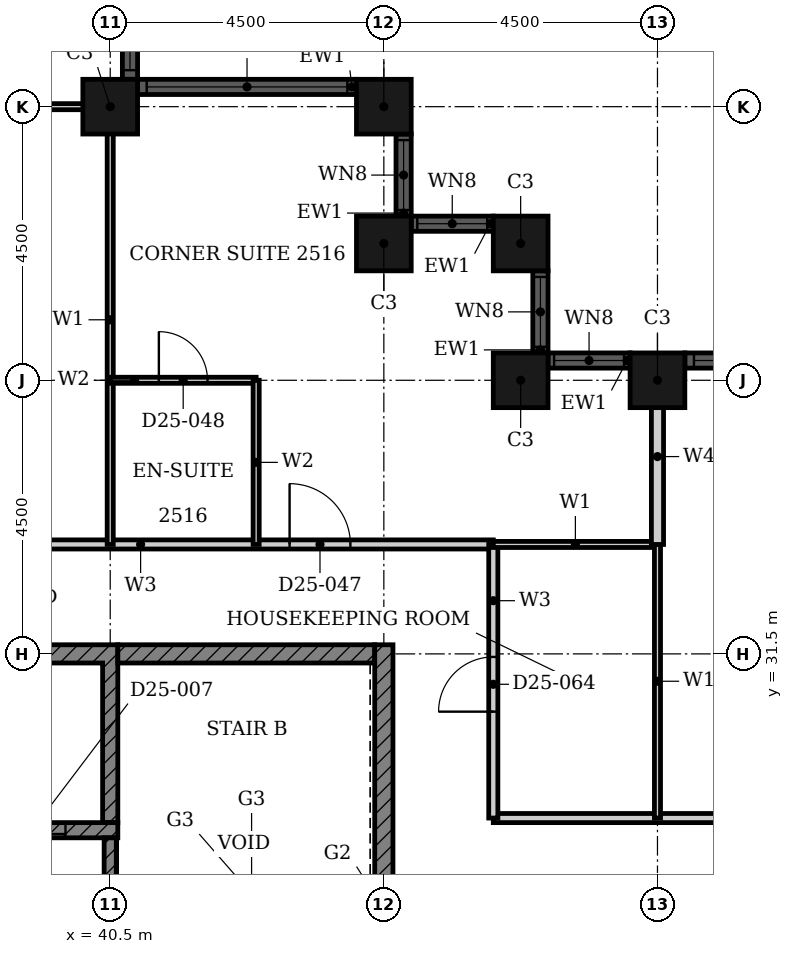
"""IFC4 building model, lengths in metres.
Left out: names, types, materials, properties, quantities, classifications, styles, units other than length and angle.
Written with IfcOpenShell. Run it as: python <this file> out.ifc"""

import sys

from ifc_helpers import new_model, si_unit, direction, frame, frame_2d, origin, origin_2d, place, context, subcontext, project, spatial, polyline, rectangle, hollow_rectangle, outline, extrude, element, fill, save


model = new_model("IFC4")
c1 = context("Model", 3, precision=1e-05, world=origin(), true_north=direction((0.0, 1.0)))
c2 = subcontext(c1, "Body", "Model", "MODEL_VIEW")
j1 = project(units=[si_unit("LENGTHUNIT", "METRE"), si_unit("PLANEANGLEUNIT", "RADIAN")], contexts=[c1])
p1 = place(None, origin())
s1 = spatial("IfcSite", under=j1, at=p1, CompositionType="ELEMENT")
p2 = place(p1, origin())
s2 = spatial("IfcBuilding", under=s1, at=p2, CompositionType="ELEMENT")
p3 = place(p2, frame((0.0, 0.0, 104.4)))
s3 = spatial("IfcBuildingStorey", under=s2, at=p3, CompositionType="ELEMENT", Elevation=104.4)
for number, where, z_axis, x_axis in (
    (1, (49.5, 36.0, 0.0), (0.0, 0.0, 1.0), (1.0, 0.0, 0.0)),
    (2, (47.25, 36.0, 0.0), (0.0, 0.0, 1.0), (1.0, 0.0, 0.0)),
    (3, (47.25, 38.25, 0.0), (0.0, 0.0, 1.0), (1.0, 0.0, 0.0)),
    (4, (45.0, 38.25, 0.0), (0.0, 0.0, 1.0), (1.0, 0.0, 0.0)),
    (5, (45.0, 40.5, 0.0), (0.0, 0.0, 1.0), (1.0, 0.0, 0.0)),
    (6, (40.5, 40.5, 0.0), (0.0, 0.0, 1.0), (1.0, 0.0, 0.0)),
):
    element("IfcColumn", number, at=place(p3, frame(where, z_axis=z_axis, x_axis=x_axis)), inside=s3, PredefinedType="COLUMN", context=c2, shape_type="SweptSolid", body=[
        extrude(hollow_rectangle(XDim=0.9, YDim=0.9, WallThickness=0.028, at=origin_2d()), origin(), (0.0, 0.0, 1.0), 3.6),
    ])
p4 = place(p3, frame((58.05, 36.325, 0.0), z_axis=(0.0, 0.0, 1.0), x_axis=(-1.0, 0.0, 0.0)))
e7 = element("IfcWall", 7, at=p4, inside=s3, PredefinedType="SOLIDWALL", context=c2, shape_type="SweptSolid", body=[
    extrude(rectangle(XDim=8.1, YDim=0.25, at=frame_2d((4.05, 0.0))), origin(), (0.0, 0.0, 1.0), 3.6),
])
p5 = place(p4, frame((0.15, 0.0, 0.9)))
e8 = element("IfcOpeningElement", 8, at=p5, cuts=e7, PredefinedType="OPENING", context=c2, shape_type="SweptSolid", body=[
    extrude(rectangle(XDim=3.3, YDim=2.08, at=frame_2d((1.65, 1.04))), frame((0.0, 0.135, 0.0), z_axis=(0.0, -1.0, 0.0), x_axis=(1.0, 0.0, 0.0)), (0.0, 0.0, 1.0), 0.27),
])
p6 = place(p4, frame((4.65, 0.0, 0.9)))
e9 = element("IfcOpeningElement", 9, at=p6, cuts=e7, PredefinedType="OPENING", context=c2, shape_type="SweptSolid", body=[
    extrude(rectangle(XDim=3.3, YDim=2.08, at=frame_2d((1.65, 1.04))), frame((0.0, 0.135, 0.0), z_axis=(0.0, -1.0, 0.0), x_axis=(1.0, 0.0, 0.0)), (0.0, 0.0, 1.0), 0.27),
])
p7 = place(p3, frame((49.05, 36.325, 0.0), z_axis=(0.0, 0.0, 1.0), x_axis=(-1.0, 0.0, 0.0)))
e10 = element("IfcWall", 10, at=p7, inside=s3, PredefinedType="SOLIDWALL", context=c2, shape_type="SweptSolid", body=[
    extrude(rectangle(XDim=1.35, YDim=0.25, at=frame_2d((0.675, 0.0))), origin(), (0.0, 0.0, 1.0), 3.6),
])
p8 = place(p7, frame((0.1, 0.0, 0.9)))
e11 = element("IfcOpeningElement", 11, at=p8, cuts=e10, PredefinedType="OPENING", context=c2, shape_type="SweptSolid", body=[
    extrude(rectangle(XDim=1.15, YDim=2.08, at=frame_2d((0.575, 1.04))), frame((0.0, 0.135, 0.0), z_axis=(0.0, -1.0, 0.0), x_axis=(1.0, 0.0, 0.0)), (0.0, 0.0, 1.0), 0.27),
])
p9 = place(p3, frame((47.575, 36.45, 0.0), z_axis=(0.0, 0.0, 1.0), x_axis=(0.0, 1.0, 0.0)))
e12 = element("IfcWall", 12, at=p9, inside=s3, PredefinedType="SOLIDWALL", context=c2, shape_type="SweptSolid", body=[
    extrude(rectangle(XDim=1.35, YDim=0.25, at=frame_2d((0.675, 0.0))), origin(), (0.0, 0.0, 1.0), 3.6),
])
p10 = place(p9, frame((0.1, 0.0, 0.9)))
e13 = element("IfcOpeningElement", 13, at=p10, cuts=e12, PredefinedType="OPENING", context=c2, shape_type="SweptSolid", body=[
    extrude(rectangle(XDim=1.15, YDim=2.08, at=frame_2d((0.575, 1.04))), frame((0.0, 0.135, 0.0), z_axis=(0.0, -1.0, 0.0), x_axis=(1.0, 0.0, 0.0)), (0.0, 0.0, 1.0), 0.27),
])
p11 = place(p3, frame((46.8, 38.575, 0.0), z_axis=(0.0, 0.0, 1.0), x_axis=(-1.0, 0.0, 0.0)))
e14 = element("IfcWall", 14, at=p11, inside=s3, PredefinedType="SOLIDWALL", context=c2, shape_type="SweptSolid", body=[
    extrude(rectangle(XDim=1.35, YDim=0.25, at=frame_2d((0.675, 0.0))), origin(), (0.0, 0.0, 1.0), 3.6),
])
p12 = place(p11, frame((0.1, 0.0, 0.9)))
e15 = element("IfcOpeningElement", 15, at=p12, cuts=e14, PredefinedType="OPENING", context=c2, shape_type="SweptSolid", body=[
    extrude(rectangle(XDim=1.15, YDim=2.08, at=frame_2d((0.575, 1.04))), frame((0.0, 0.135, 0.0), z_axis=(0.0, -1.0, 0.0), x_axis=(1.0, 0.0, 0.0)), (0.0, 0.0, 1.0), 0.27),
])
p13 = place(p3, frame((45.325, 38.7, 0.0), z_axis=(0.0, 0.0, 1.0), x_axis=(0.0, 1.0, 0.0)))
e16 = element("IfcWall", 16, at=p13, inside=s3, PredefinedType="SOLIDWALL", context=c2, shape_type="SweptSolid", body=[
    extrude(rectangle(XDim=1.35, YDim=0.25, at=frame_2d((0.675, 0.0))), origin(), (0.0, 0.0, 1.0), 3.6),
])
p14 = place(p13, frame((0.1, 0.0, 0.9)))
e17 = element("IfcOpeningElement", 17, at=p14, cuts=e16, PredefinedType="OPENING", context=c2, shape_type="SweptSolid", body=[
    extrude(rectangle(XDim=1.15, YDim=2.08, at=frame_2d((0.575, 1.04))), frame((0.0, 0.135, 0.0), z_axis=(0.0, -1.0, 0.0), x_axis=(1.0, 0.0, 0.0)), (0.0, 0.0, 1.0), 0.27),
])
p15 = place(p3, frame((44.55, 40.825, 0.0), z_axis=(0.0, 0.0, 1.0), x_axis=(-1.0, 0.0, 0.0)))
e18 = element("IfcWall", 18, at=p15, inside=s3, PredefinedType="SOLIDWALL", context=c2, shape_type="SweptSolid", body=[
    extrude(rectangle(XDim=3.6, YDim=0.25, at=frame_2d((1.8, 0.0))), origin(), (0.0, 0.0, 1.0), 3.6),
])
p16 = place(p15, frame((0.15, 0.0, 0.9)))
e19 = element("IfcOpeningElement", 19, at=p16, cuts=e18, PredefinedType="OPENING", context=c2, shape_type="SweptSolid", body=[
    extrude(rectangle(XDim=3.3, YDim=2.08, at=frame_2d((1.65, 1.04))), frame((0.0, 0.135, 0.0), z_axis=(0.0, -1.0, 0.0), x_axis=(1.0, 0.0, 0.0)), (0.0, 0.0, 1.0), 0.27),
])
p17 = place(p3, frame((40.825, 40.95, 0.0), z_axis=(0.0, 0.0, 1.0), x_axis=(0.0, 1.0, 0.0)))
e20 = element("IfcWall", 20, at=p17, inside=s3, PredefinedType="SOLIDWALL", context=c2, shape_type="SweptSolid", body=[
    extrude(rectangle(XDim=8.1, YDim=0.25, at=frame_2d((4.05, 0.0))), origin(), (0.0, 0.0, 1.0), 3.6),
])
p18 = place(p17, frame((0.15, 0.0, 0.9)))
e21 = element("IfcOpeningElement", 21, at=p18, cuts=e20, PredefinedType="OPENING", context=c2, shape_type="SweptSolid", body=[
    extrude(rectangle(XDim=3.3, YDim=2.08, at=frame_2d((1.65, 1.04))), frame((0.0, 0.135, 0.0), z_axis=(0.0, -1.0, 0.0), x_axis=(1.0, 0.0, 0.0)), (0.0, 0.0, 1.0), 0.27),
])
p19 = place(p17, frame((4.65, 0.0, 0.9)))
e22 = element("IfcOpeningElement", 22, at=p19, cuts=e20, PredefinedType="OPENING", context=c2, shape_type="SweptSolid", body=[
    extrude(rectangle(XDim=3.3, YDim=2.08, at=frame_2d((1.65, 1.04))), frame((0.0, 0.135, 0.0), z_axis=(0.0, -1.0, 0.0), x_axis=(1.0, 0.0, 0.0)), (0.0, 0.0, 1.0), 0.27),
])
p20 = place(p3, origin())
e23 = element("IfcWall", 23, at=p20, inside=s3, PredefinedType="SHEAR", context=c2, shape_type="SweptSolid", body=[
    extrude(outline(polyline([(24.947, 28.725), (25.197, 28.725), (25.197, 31.35), (27.518, 31.35), (27.518, 28.725), (27.768, 28.725), (27.768, 31.35), (30.089, 31.35), (30.089, 28.725), (30.339, 28.725), (30.339, 31.35), (32.661, 31.35), (32.661, 28.725), (32.911, 28.725), (32.911, 31.35), (35.232, 31.35), (35.232, 28.725), (35.482, 28.725), (35.482, 31.35), (37.803, 31.35), (37.803, 28.725), (38.053, 28.725), (38.053, 31.35), (40.375, 31.35), (40.375, 28.725), (40.625, 28.725), (40.625, 31.65), (24.947, 31.65), (24.947, 28.725)])), origin(), (0.0, 0.0, 1.0), 3.3),
])
p21 = place(p3, frame((40.625, 31.5, 0.0), z_axis=(0.0, 0.0, 1.0), x_axis=(1.0, 0.0, 0.0)))
e24 = element("IfcWall", 24, at=p21, inside=s3, PredefinedType="SHEAR", context=c2, shape_type="SweptSolid", body=[
    extrude(rectangle(XDim=4.225, YDim=0.3, at=frame_2d((2.113, 0.0))), origin(), (0.0, 0.0, 1.0), 3.3),
])
p22 = place(p3, frame((45.0, 22.35, 0.0), z_axis=(0.0, 0.0, 1.0), x_axis=(0.0, 1.0, 0.0)))
e25 = element("IfcWall", 25, at=p22, inside=s3, PredefinedType="SHEAR", context=c2, shape_type="SweptSolid", body=[
    extrude(rectangle(XDim=9.3, YDim=0.3, at=frame_2d((4.65, 0.0))), origin(), (0.0, 0.0, 1.0), 3.3),
])
p23 = place(p3, frame((24.947, 28.6, 0.0), z_axis=(0.0, 0.0, 1.0), x_axis=(1.0, 0.0, 0.0)))
e26 = element("IfcWall", 26, at=p23, inside=s3, PredefinedType="SHEAR", context=c2, shape_type="SweptSolid", body=[
    extrude(rectangle(XDim=15.678, YDim=0.25, at=frame_2d((7.839, 0.0))), origin(), (0.0, 0.0, 1.0), 3.3),
])
p24 = place(p23, frame((0.861, 0.0, 0.0)))
e27 = element("IfcOpeningElement", 27, at=p24, cuts=e26, PredefinedType="OPENING", context=c2, shape_type="SweptSolid", body=[
    extrude(rectangle(XDim=1.1, YDim=2.1, at=frame_2d((0.55, 1.05))), frame((0.0, 0.135, 0.0), z_axis=(0.0, -1.0, 0.0), x_axis=(1.0, 0.0, 0.0)), (0.0, 0.0, 1.0), 0.27),
])
p25 = place(p23, frame((8.575, 0.0, 0.0)))
e28 = element("IfcOpeningElement", 28, at=p25, cuts=e26, PredefinedType="OPENING", context=c2, shape_type="SweptSolid", body=[
    extrude(rectangle(XDim=1.1, YDim=2.1, at=frame_2d((0.55, 1.05))), frame((0.0, 0.135, 0.0), z_axis=(0.0, -1.0, 0.0), x_axis=(1.0, 0.0, 0.0)), (0.0, 0.0, 1.0), 0.27),
])
p26 = place(p23, frame((13.718, 0.0, 0.0)))
e29 = element("IfcOpeningElement", 29, at=p26, cuts=e26, PredefinedType="OPENING", context=c2, shape_type="SweptSolid", body=[
    extrude(rectangle(XDim=1.1, YDim=2.1, at=frame_2d((0.55, 1.05))), frame((0.0, 0.135, 0.0), z_axis=(0.0, -1.0, 0.0), x_axis=(1.0, 0.0, 0.0)), (0.0, 0.0, 1.0), 0.27),
])
p27 = place(p3, frame((40.5, 22.65, 0.0), z_axis=(0.0, 0.0, 1.0), x_axis=(0.0, 1.0, 0.0)))
e30 = element("IfcWall", 30, at=p27, inside=s3, PredefinedType="SHEAR", context=c2, shape_type="SweptSolid", body=[
    extrude(rectangle(XDim=5.825, YDim=0.2, at=frame_2d((2.913, 0.0))), origin(), (0.0, 0.0, 1.0), 3.3),
])
p28 = place(p27, frame((0.25, 0.0, 0.0)))
e31 = element("IfcOpeningElement", 31, at=p28, cuts=e30, PredefinedType="OPENING", context=c2, shape_type="SweptSolid", body=[
    extrude(rectangle(XDim=1.8, YDim=2.1, at=frame_2d((0.9, 1.05))), frame((0.0, 0.11, 0.0), z_axis=(0.0, -1.0, 0.0), x_axis=(1.0, 0.0, 0.0)), (0.0, 0.0, 1.0), 0.22),
])
p29 = place(p3, frame((46.8, 28.8, 0.0), z_axis=(0.0, 0.0, 1.0), x_axis=(1.0, 0.0, 0.0)))
e32 = element("IfcWall", 32, at=p29, inside=s3, PredefinedType="PARTITIONING", context=c2, shape_type="SweptSolid", body=[
    extrude(rectangle(XDim=11.7, YDim=0.15, at=frame_2d((5.85, 0.0))), origin(), (0.0, 0.0, 1.0), 3.3),
])
p30 = place(p29, frame((4.45, 0.0, 0.0)))
e33 = element("IfcOpeningElement", 33, at=p30, cuts=e32, PredefinedType="OPENING", context=c2, shape_type="SweptSolid", body=[
    extrude(rectangle(XDim=1.0, YDim=2.1, at=frame_2d((0.5, 1.05))), frame((0.0, 0.085, 0.0), z_axis=(0.0, -1.0, 0.0), x_axis=(1.0, 0.0, 0.0)), (0.0, 0.0, 1.0), 0.17),
])
p31 = place(p3, frame((33.3, 33.3, 0.0), z_axis=(0.0, 0.0, 1.0), x_axis=(1.0, 0.0, 0.0)))
e34 = element("IfcWall", 34, at=p31, inside=s3, PredefinedType="PARTITIONING", context=c2, shape_type="SweptSolid", body=[
    extrude(rectangle(XDim=13.5, YDim=0.15, at=frame_2d((6.75, 0.0))), origin(), (0.0, 0.0, 1.0), 3.3),
])
p32 = place(p31, frame((10.15, 0.0, 0.0)))
e35 = element("IfcOpeningElement", 35, at=p32, cuts=e34, PredefinedType="OPENING", context=c2, shape_type="SweptSolid", body=[
    extrude(rectangle(XDim=1.0, YDim=2.1, at=frame_2d((0.5, 1.05))), frame((0.0, 0.085, 0.0), z_axis=(0.0, -1.0, 0.0), x_axis=(1.0, 0.0, 0.0)), (0.0, 0.0, 1.0), 0.17),
])
p33 = place(p31, frame((0.75, 0.0, 0.0)))
e36 = element("IfcOpeningElement", 36, at=p33, cuts=e34, PredefinedType="OPENING", context=c2, shape_type="SweptSolid", body=[
    extrude(rectangle(XDim=0.9, YDim=2.1, at=frame_2d((0.45, 1.05))), frame((0.0, 0.085, 0.0), z_axis=(0.0, -1.0, 0.0), x_axis=(1.0, 0.0, 0.0)), (0.0, 0.0, 1.0), 0.17),
])
p34 = place(p31, frame((4.35, 0.0, 0.0)))
e37 = element("IfcOpeningElement", 37, at=p34, cuts=e34, PredefinedType="OPENING", context=c2, shape_type="SweptSolid", body=[
    extrude(rectangle(XDim=0.9, YDim=2.1, at=frame_2d((0.45, 1.05))), frame((0.0, 0.085, 0.0), z_axis=(0.0, -1.0, 0.0), x_axis=(1.0, 0.0, 0.0)), (0.0, 0.0, 1.0), 0.17),
])
p35 = place(p3, frame((46.8, 28.8, 0.0), z_axis=(0.0, 0.0, 1.0), x_axis=(0.0, 1.0, 0.0)))
e38 = element("IfcWall", 38, at=p35, inside=s3, PredefinedType="PARTITIONING", context=c2, shape_type="SweptSolid", body=[
    extrude(rectangle(XDim=4.5, YDim=0.15, at=frame_2d((2.25, 0.0))), origin(), (0.0, 0.0, 1.0), 3.3),
])
p36 = place(p35, frame((1.75, 0.0, 0.0)))
e39 = element("IfcOpeningElement", 39, at=p36, cuts=e38, PredefinedType="OPENING", context=c2, shape_type="SweptSolid", body=[
    extrude(rectangle(XDim=0.9, YDim=2.1, at=frame_2d((0.45, 1.05))), frame((0.0, 0.085, 0.0), z_axis=(0.0, -1.0, 0.0), x_axis=(1.0, 0.0, 0.0)), (0.0, 0.0, 1.0), 0.17),
])
p37 = place(p3, frame((46.8, 33.3, 0.0), z_axis=(0.0, 0.0, 1.0), x_axis=(1.0, 0.0, 0.0)))
e40 = element("IfcWall", 40, at=p37, inside=s3, PredefinedType="PARTITIONING", context=c2, shape_type="SweptSolid", body=[
    extrude(rectangle(XDim=2.7, YDim=0.1, at=frame_2d((1.35, 0.0))), origin(), (0.0, 0.0, 1.0), 3.3),
])
p38 = place(p3, frame((33.3, 40.5, 0.0), z_axis=(0.0, 0.0, 1.0), x_axis=(1.0, 0.0, 0.0)))
e41 = element("IfcWall", 41, at=p38, inside=s3, PredefinedType="PARTITIONING", context=c2, shape_type="SweptSolid", body=[
    extrude(rectangle(XDim=7.39, YDim=0.1, at=frame_2d((3.695, 0.0))), origin(), (0.0, 0.0, 1.0), 2.38),
])
p39 = place(p3, frame((40.5, 33.3, 0.0), z_axis=(0.0, 0.0, 1.0), x_axis=(0.0, 1.0, 0.0)))
e42 = element("IfcWall", 42, at=p39, inside=s3, PredefinedType="PARTITIONING", context=c2, shape_type="SweptSolid", body=[
    extrude(rectangle(XDim=7.39, YDim=0.1, at=frame_2d((3.695, 0.0))), origin(), (0.0, 0.0, 1.0), 3.3),
])
p40 = place(p3, frame((49.5, 28.8, 0.0), z_axis=(0.0, 0.0, 1.0), x_axis=(0.0, 1.0, 0.0)))
e43 = element("IfcWall", 43, at=p40, inside=s3, PredefinedType="PARTITIONING", context=c2, shape_type="SweptSolid", body=[
    extrude(rectangle(XDim=4.5, YDim=0.1, at=frame_2d((2.25, 0.0))), origin(), (0.0, 0.0, 1.0), 2.38),
])
p41 = place(p3, frame((49.5, 33.3, 0.0), z_axis=(0.0, 0.0, 1.0), x_axis=(0.0, 1.0, 0.0)))
e44 = element("IfcWall", 44, at=p41, inside=s3, PredefinedType="PARTITIONING", context=c2, shape_type="SweptSolid", body=[
    extrude(rectangle(XDim=2.89, YDim=0.2, at=frame_2d((1.445, 0.0))), origin(), (0.0, 0.0, 1.0), 2.38),
])
p42 = place(p3, frame((40.5, 36.0, 0.0), z_axis=(0.0, 0.0, 1.0), x_axis=(1.0, 0.0, 0.0)))
e45 = element("IfcWall", 45, at=p42, inside=s3, PredefinedType="PARTITIONING", context=c2, shape_type="SweptSolid", body=[
    extrude(rectangle(XDim=2.4, YDim=0.1, at=frame_2d((1.2, 0.0))), origin(), (0.0, 0.0, 1.0), 3.3),
])
p43 = place(p42, frame((0.8, 0.0, 0.0)))
e46 = element("IfcOpeningElement", 46, at=p43, cuts=e45, PredefinedType="OPENING", context=c2, shape_type="SweptSolid", body=[
    extrude(rectangle(XDim=0.8, YDim=2.1, at=frame_2d((0.4, 1.05))), frame((0.0, 0.06, 0.0), z_axis=(0.0, -1.0, 0.0), x_axis=(1.0, 0.0, 0.0)), (0.0, 0.0, 1.0), 0.12),
])
p44 = place(p3, frame((42.9, 33.3, 0.0), z_axis=(0.0, 0.0, 1.0), x_axis=(0.0, 1.0, 0.0)))
e47 = element("IfcWall", 47, at=p44, inside=s3, PredefinedType="PARTITIONING", context=c2, shape_type="SweptSolid", body=[
    extrude(rectangle(XDim=2.7, YDim=0.1, at=frame_2d((1.35, 0.0))), origin(), (0.0, 0.0, 1.0), 3.3),
])
p45 = place(p6, origin())
e48 = element("IfcWindow", 48, at=p45, inside=s3, PartitioningType="SINGLE_PANEL", PredefinedType="WINDOW", context=c2, shape_type="SweptSolid", body=[
    extrude(rectangle(XDim=3.3, YDim=2.08, at=frame_2d((1.65, 1.04))), frame((0.0, 0.03, 0.0), z_axis=(0.0, -1.0, 0.0), x_axis=(1.0, 0.0, 0.0)), (0.0, 0.0, 1.0), 0.06),
])
fill(e9, e48)
p46 = place(p8, origin())
e49 = element("IfcWindow", 49, at=p46, inside=s3, PartitioningType="SINGLE_PANEL", PredefinedType="WINDOW", context=c2, shape_type="SweptSolid", body=[
    extrude(rectangle(XDim=1.15, YDim=2.08, at=frame_2d((0.575, 1.04))), frame((0.0, 0.03, 0.0), z_axis=(0.0, -1.0, 0.0), x_axis=(1.0, 0.0, 0.0)), (0.0, 0.0, 1.0), 0.06),
])
fill(e11, e49)
p47 = place(p10, origin())
e50 = element("IfcWindow", 50, at=p47, inside=s3, PartitioningType="SINGLE_PANEL", PredefinedType="WINDOW", context=c2, shape_type="SweptSolid", body=[
    extrude(rectangle(XDim=1.15, YDim=2.08, at=frame_2d((0.575, 1.04))), frame((0.0, 0.03, 0.0), z_axis=(0.0, -1.0, 0.0), x_axis=(1.0, 0.0, 0.0)), (0.0, 0.0, 1.0), 0.06),
])
fill(e13, e50)
p48 = place(p12, origin())
e51 = element("IfcWindow", 51, at=p48, inside=s3, PartitioningType="SINGLE_PANEL", PredefinedType="WINDOW", context=c2, shape_type="SweptSolid", body=[
    extrude(rectangle(XDim=1.15, YDim=2.08, at=frame_2d((0.575, 1.04))), frame((0.0, 0.03, 0.0), z_axis=(0.0, -1.0, 0.0), x_axis=(1.0, 0.0, 0.0)), (0.0, 0.0, 1.0), 0.06),
])
fill(e15, e51)
p49 = place(p14, origin())
e52 = element("IfcWindow", 52, at=p49, inside=s3, PartitioningType="SINGLE_PANEL", PredefinedType="WINDOW", context=c2, shape_type="SweptSolid", body=[
    extrude(rectangle(XDim=1.15, YDim=2.08, at=frame_2d((0.575, 1.04))), frame((0.0, 0.03, 0.0), z_axis=(0.0, -1.0, 0.0), x_axis=(1.0, 0.0, 0.0)), (0.0, 0.0, 1.0), 0.06),
])
fill(e17, e52)
p50 = place(p16, origin())
e53 = element("IfcWindow", 53, at=p50, inside=s3, PartitioningType="SINGLE_PANEL", PredefinedType="WINDOW", context=c2, shape_type="SweptSolid", body=[
    extrude(rectangle(XDim=3.3, YDim=2.08, at=frame_2d((1.65, 1.04))), frame((0.0, 0.03, 0.0), z_axis=(0.0, -1.0, 0.0), x_axis=(1.0, 0.0, 0.0)), (0.0, 0.0, 1.0), 0.06),
])
fill(e19, e53)
p51 = place(p18, origin())
e54 = element("IfcWindow", 54, at=p51, inside=s3, PartitioningType="SINGLE_PANEL", PredefinedType="WINDOW", context=c2, shape_type="SweptSolid", body=[
    extrude(rectangle(XDim=3.3, YDim=2.08, at=frame_2d((1.65, 1.04))), frame((0.0, 0.03, 0.0), z_axis=(0.0, -1.0, 0.0), x_axis=(1.0, 0.0, 0.0)), (0.0, 0.0, 1.0), 0.06),
])
fill(e21, e54)
p52 = place(p26, origin())
e55 = element("IfcDoor", 55, at=p52, inside=s3, OperationType="DOUBLE_DOOR_SLIDING", PredefinedType="DOOR", context=c2, shape_type="SweptSolid", body=[
    extrude(rectangle(XDim=1.1, YDim=2.1, at=frame_2d((0.55, 1.05))), frame((0.0, 0.025, 0.0), z_axis=(0.0, -1.0, 0.0), x_axis=(1.0, 0.0, 0.0)), (0.0, 0.0, 1.0), 0.05),
])
fill(e29, e55)
p53 = place(p32, origin())
e56 = element("IfcDoor", 56, at=p53, inside=s3, OperationType="SINGLE_SWING_RIGHT", PredefinedType="DOOR", context=c2, shape_type="SweptSolid", body=[
    extrude(rectangle(XDim=1.0, YDim=2.1, at=frame_2d((0.5, 1.05))), frame((0.0, 0.025, 0.0), z_axis=(0.0, -1.0, 0.0), x_axis=(1.0, 0.0, 0.0)), (0.0, 0.0, 1.0), 0.05),
])
fill(e35, e56)
p54 = place(p43, origin())
e57 = element("IfcDoor", 57, at=p54, inside=s3, OperationType="SINGLE_SWING_RIGHT", PredefinedType="DOOR", context=c2, shape_type="SweptSolid", body=[
    extrude(rectangle(XDim=0.8, YDim=2.1, at=frame_2d((0.4, 1.05))), frame((0.0, 0.025, 0.0), z_axis=(0.0, -1.0, 0.0), x_axis=(1.0, 0.0, 0.0)), (0.0, 0.0, 1.0), 0.05),
])
fill(e46, e57)
p55 = place(p36, origin())
e58 = element("IfcDoor", 58, at=p55, inside=s3, OperationType="SINGLE_SWING_RIGHT", PredefinedType="DOOR", context=c2, shape_type="SweptSolid", body=[
    extrude(rectangle(XDim=0.9, YDim=2.1, at=frame_2d((0.45, 1.05))), frame((0.0, 0.025, 0.0), z_axis=(0.0, -1.0, 0.0), x_axis=(1.0, 0.0, 0.0)), (0.0, 0.0, 1.0), 0.05),
])
fill(e39, e58)
save(model, sys.argv[1])
